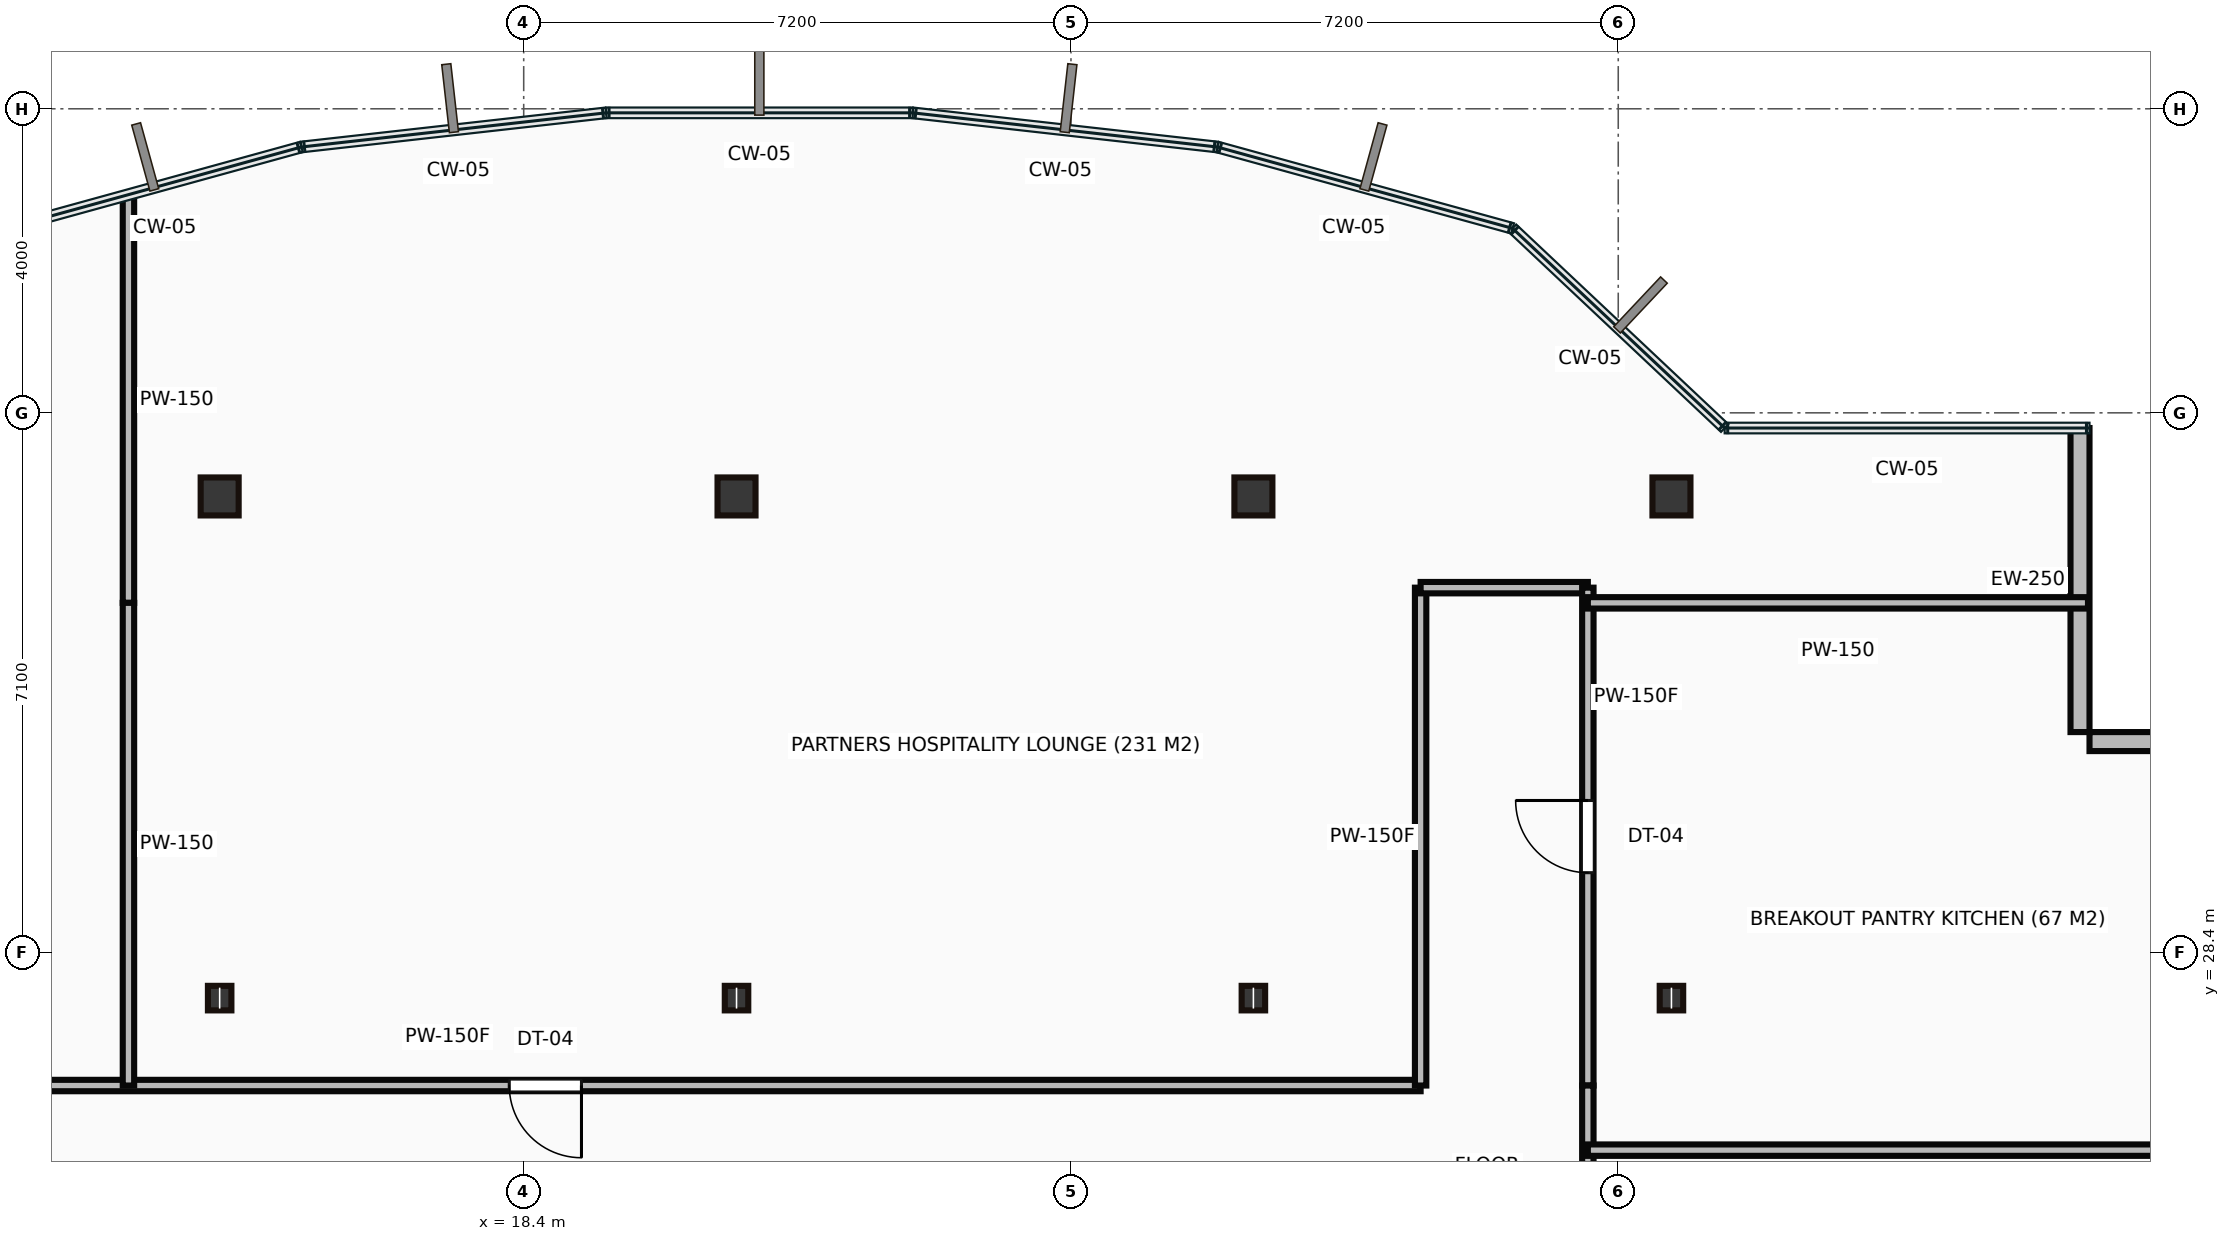
"""IFC4 building model, lengths in metres.
Left out: names, types, materials, properties, quantities, classifications, styles, units other than length and angle.
Written with IfcOpenShell. Run it as: python <this file> out.ifc"""

import sys

from ifc_helpers import new_model, si_unit, direction, frame, frame_2d, origin, origin_2d, place, context, subcontext, project, spatial, rectangle, hollow_rectangle, i_section, extrude, source, transform, mapped, element, fill, save


model = new_model("IFC4")
c1 = context("Model", 3, precision=1e-05, world=origin(), true_north=direction((0.0, 1.0)))
c2 = subcontext(c1, "Body", "Model", "MODEL_VIEW")
j1 = project(units=[si_unit("LENGTHUNIT", "METRE"), si_unit("PLANEANGLEUNIT", "RADIAN")], contexts=[c1])
p1 = place(None, origin())
s1 = spatial("IfcSite", under=j1, at=p1, CompositionType="ELEMENT")
p2 = place(p1, origin())
s2 = spatial("IfcBuilding", under=s1, at=p2, CompositionType="ELEMENT")
p3 = place(p2, frame((0.0, 0.0, 221.45)))
s3 = spatial("IfcBuildingStorey", under=s2, at=p3, CompositionType="ELEMENT", Elevation=221.45)
m1 = source(origin(), c2, "Body", "SweptSolid", [
    extrude(i_section(OverallWidth=0.309, OverallDepth=0.323, WebThickness=0.014, FlangeThickness=0.023, at=origin_2d()), origin(), (0.0, 0.0, 1.0), 3.65),
])
p4 = place(p3, frame((14.4, 27.8, 0.0), z_axis=(0.0, 0.0, 1.0), x_axis=(1.0, 0.0, 0.0)))
e1 = element("IfcColumn", 1, at=p4, inside=s3, PredefinedType="COLUMN", context=c2, shape_type="MappedRepresentation", body=[
    mapped(m1, transform((0.0, 0.0, 0.0))),
])
m2 = source(origin(), c2, "Body", "SweptSolid", [
    extrude(hollow_rectangle(XDim=0.5, YDim=0.5, WallThickness=0.022, at=origin_2d()), origin(), (0.0, 0.0, 1.0), 3.65),
])
p5 = place(p3, frame((14.4, 34.4, 0.0), z_axis=(0.0, 0.0, 1.0), x_axis=(1.0, 0.0, 0.0)))
e2 = element("IfcColumn", 2, at=p5, inside=s3, PredefinedType="COLUMN", context=c2, shape_type="MappedRepresentation", body=[
    mapped(m2, transform((0.0, 0.0, 0.0))),
])
p6 = place(p3, frame((21.2, 27.8, 0.0), z_axis=(0.0, 0.0, 1.0), x_axis=(1.0, 0.0, 0.0)))
e3 = element("IfcColumn", 3, at=p6, inside=s3, PredefinedType="COLUMN", context=c2, shape_type="MappedRepresentation", body=[
    mapped(m1, transform((0.0, 0.0, 0.0))),
])
p7 = place(p3, frame((21.2, 34.4, 0.0), z_axis=(0.0, 0.0, 1.0), x_axis=(1.0, 0.0, 0.0)))
e4 = element("IfcColumn", 4, at=p7, inside=s3, PredefinedType="COLUMN", context=c2, shape_type="MappedRepresentation", body=[
    mapped(m2, transform((0.0, 0.0, 0.0))),
])
p8 = place(p3, frame((28.0, 27.8, 0.0), z_axis=(0.0, 0.0, 1.0), x_axis=(1.0, 0.0, 0.0)))
e5 = element("IfcColumn", 5, at=p8, inside=s3, PredefinedType="COLUMN", context=c2, shape_type="MappedRepresentation", body=[
    mapped(m1, transform((0.0, 0.0, 0.0))),
])
p9 = place(p3, frame((28.0, 34.4, 0.0), z_axis=(0.0, 0.0, 1.0), x_axis=(1.0, 0.0, 0.0)))
e6 = element("IfcColumn", 6, at=p9, inside=s3, PredefinedType="COLUMN", context=c2, shape_type="MappedRepresentation", body=[
    mapped(m2, transform((0.0, 0.0, 0.0))),
])
p10 = place(p3, frame((33.5, 27.8, 0.0), z_axis=(0.0, 0.0, 1.0), x_axis=(1.0, 0.0, 0.0)))
e7 = element("IfcColumn", 7, at=p10, inside=s3, PredefinedType="COLUMN", context=c2, shape_type="MappedRepresentation", body=[
    mapped(m1, transform((0.0, 0.0, 0.0))),
])
p11 = place(p3, frame((33.5, 34.4, 0.0), z_axis=(0.0, 0.0, 1.0), x_axis=(1.0, 0.0, 0.0)))
e8 = element("IfcColumn", 8, at=p11, inside=s3, PredefinedType="COLUMN", context=c2, shape_type="MappedRepresentation", body=[
    mapped(m2, transform((0.0, 0.0, 0.0))),
])
m3 = source(origin(), c2, "Body", "SweptSolid", [
    extrude(rectangle(XDim=4.0, YDim=0.25, at=frame_2d((2.0, 0.0))), origin(), (0.0, 0.0, 1.0), 3.4),
])
for number, where, z_axis, x_axis in (
    (9, (43.0, 31.175, 0.0), (0.0, 0.0, 1.0), (-1.0, 0.0, 0.0)),
    (10, (38.875, 31.3, 0.0), (0.0, 0.0, 1.0), (0.0, 1.0, 0.0)),
):
    element("IfcWall", number, at=place(p3, frame(where, z_axis=z_axis, x_axis=x_axis)), inside=s3, PredefinedType="STANDARD", context=c2, shape_type="MappedRepresentation", body=[
        mapped(m3, transform((0.0, 0.0, 0.0))),
    ])
m4 = source(origin(), c2, "Body", "SweptSolid", [
    extrude(rectangle(XDim=25.6, YDim=0.15, at=frame_2d((12.8, 0.0))), origin(), (0.0, 0.0, 1.0), 3.4),
])
p12 = place(p3, frame((4.6, 26.65, 0.0), z_axis=(0.0, 0.0, 1.0), x_axis=(1.0, 0.0, 0.0)))
e11 = element("IfcWall", 11, at=p12, inside=s3, PredefinedType="PARTITIONING", context=c2, shape_type="MappedRepresentation", body=[
    mapped(m4, transform((0.0, 0.0, 0.0))),
])
p13 = place(p12, frame((3.955, 0.0, 0.0)))
e12 = element("IfcOpeningElement", 12, at=p13, cuts=e11, PredefinedType="OPENING", context=c2, shape_type="SweptSolid", body=[
    extrude(rectangle(XDim=0.95, YDim=2.15, at=frame_2d((0.475, 1.075))), frame((0.0, 0.085, 0.0), z_axis=(0.0, -1.0, 0.0), x_axis=(1.0, 0.0, 0.0)), (0.0, 0.0, 1.0), 0.17),
])
p14 = place(p12, frame((13.61, 0.0, 0.0)))
e13 = element("IfcOpeningElement", 13, at=p14, cuts=e11, PredefinedType="OPENING", context=c2, shape_type="SweptSolid", body=[
    extrude(rectangle(XDim=0.95, YDim=2.15, at=frame_2d((0.475, 1.075))), frame((0.0, 0.085, 0.0), z_axis=(0.0, -1.0, 0.0), x_axis=(1.0, 0.0, 0.0)), (0.0, 0.0, 1.0), 0.17),
])
m5 = source(origin(), c2, "Body", "SweptSolid", [
    extrude(rectangle(XDim=6.55, YDim=0.15, at=frame_2d((3.275, 0.0))), origin(), (0.0, 0.0, 1.0), 3.4),
])
p15 = place(p3, frame((30.2, 26.65, 0.0), z_axis=(0.0, 0.0, 1.0), x_axis=(0.0, 1.0, 0.0)))
e14 = element("IfcWall", 14, at=p15, inside=s3, PredefinedType="PARTITIONING", context=c2, shape_type="MappedRepresentation", body=[
    mapped(m5, transform((0.0, 0.0, 0.0))),
])
m6 = source(origin(), c2, "Body", "SweptSolid", [
    extrude(rectangle(XDim=2.2, YDim=0.15, at=frame_2d((1.1, 0.0))), origin(), (0.0, 0.0, 1.0), 3.4),
])
p16 = place(p3, frame((30.2, 33.2, 0.0), z_axis=(0.0, 0.0, 1.0), x_axis=(1.0, 0.0, 0.0)))
e15 = element("IfcWall", 15, at=p16, inside=s3, PredefinedType="PARTITIONING", context=c2, shape_type="MappedRepresentation", body=[
    mapped(m6, transform((0.0, 0.0, 0.0))),
])
p17 = place(p3, frame((32.4, 33.2, 0.0), z_axis=(0.0, 0.0, 1.0), x_axis=(0.0, -1.0, 0.0)))
e16 = element("IfcWall", 16, at=p17, inside=s3, PredefinedType="PARTITIONING", context=c2, shape_type="MappedRepresentation", body=[
    mapped(m5, transform((0.0, 0.0, 0.0))),
])
p18 = place(p17, frame((2.8, 0.0, 0.0)))
e17 = element("IfcOpeningElement", 17, at=p18, cuts=e16, PredefinedType="OPENING", context=c2, shape_type="SweptSolid", body=[
    extrude(rectangle(XDim=0.95, YDim=2.15, at=frame_2d((0.475, 1.075))), frame((0.0, 0.085, 0.0), z_axis=(0.0, -1.0, 0.0), x_axis=(1.0, 0.0, 0.0)), (0.0, 0.0, 1.0), 0.17),
])
m7 = source(origin(), c2, "Body", "SweptSolid", [
    extrude(rectangle(XDim=2.05, YDim=0.15, at=frame_2d((1.025, 0.0))), origin(), (0.0, 0.0, 1.0), 3.4),
])
p19 = place(p3, frame((32.4, 26.65, 0.0), z_axis=(0.0, 0.0, 1.0), x_axis=(0.0, -1.0, 0.0)))
e18 = element("IfcWall", 18, at=p19, inside=s3, PredefinedType="PARTITIONING", context=c2, shape_type="MappedRepresentation", body=[
    mapped(m7, transform((0.0, 0.0, 0.0))),
])
m8 = source(origin(), c2, "Body", "SweptSolid", [
    extrude(rectangle(XDim=5.35, YDim=0.15, at=frame_2d((2.675, 0.0))), origin(), (0.0, 0.0, 1.0), 3.4),
])
p20 = place(p3, frame((13.2, 38.35, 0.0), z_axis=(0.0, 0.0, 1.0), x_axis=(0.0, -1.0, 0.0)))
e19 = element("IfcWall", 19, at=p20, inside=s3, PredefinedType="PARTITIONING", context=c2, shape_type="MappedRepresentation", body=[
    mapped(m8, transform((0.0, 0.0, 0.0))),
])
m9 = source(origin(), c2, "Body", "SweptSolid", [
    extrude(rectangle(XDim=6.35, YDim=0.15, at=frame_2d((3.175, 0.0))), origin(), (0.0, 0.0, 1.0), 3.4),
])
p21 = place(p3, frame((13.2, 33.0, 0.0), z_axis=(0.0, 0.0, 1.0), x_axis=(0.0, -1.0, 0.0)))
e20 = element("IfcWall", 20, at=p21, inside=s3, PredefinedType="PARTITIONING", context=c2, shape_type="MappedRepresentation", body=[
    mapped(m9, transform((0.0, 0.0, 0.0))),
])
m10 = source(origin(), c2, "Body", "SweptSolid", [
    extrude(rectangle(XDim=10.58, YDim=0.15, at=frame_2d((5.29, 0.0))), origin(), (0.0, 0.0, 1.0), 3.4),
])
p22 = place(p3, frame((42.98, 25.8, 0.0), z_axis=(0.0, 0.0, 1.0), x_axis=(-1.0, 0.0, 0.0)))
e21 = element("IfcWall", 21, at=p22, inside=s3, PredefinedType="PARTITIONING", context=c2, shape_type="MappedRepresentation", body=[
    mapped(m10, transform((0.0, 0.0, 0.0))),
])
m11 = source(origin(), c2, "Body", "SweptSolid", [
    extrude(rectangle(XDim=6.58, YDim=0.15, at=frame_2d((3.29, 0.0))), origin(), (0.0, 0.0, 1.0), 3.4),
])
p23 = place(p3, frame((38.98, 33.0, 0.0), z_axis=(0.0, 0.0, 1.0), x_axis=(-1.0, 0.0, 0.0)))
e22 = element("IfcWall", 22, at=p23, inside=s3, PredefinedType="PARTITIONING", context=c2, shape_type="MappedRepresentation", body=[
    mapped(m11, transform((0.0, 0.0, 0.0))),
])
m12 = source(origin(), c2, "Body", "SweptSolid", [
    extrude(rectangle(XDim=0.95, YDim=2.15, at=frame_2d((0.475, 1.075))), frame((0.0, 0.025, 0.0), z_axis=(0.0, -1.0, 0.0), x_axis=(1.0, 0.0, 0.0)), (0.0, 0.0, 1.0), 0.05),
])
p24 = place(p14, origin())
e23 = element("IfcDoor", 23, at=p24, inside=s3, OperationType="SINGLE_SWING_RIGHT", PredefinedType="DOOR", context=c2, shape_type="MappedRepresentation", body=[
    mapped(m12, transform((0.0, 0.0, 0.0))),
])
fill(e13, e23)
p25 = place(p18, origin())
e24 = element("IfcDoor", 24, at=p25, inside=s3, OperationType="SINGLE_SWING_LEFT", PredefinedType="DOOR", context=c2, shape_type="MappedRepresentation", body=[
    mapped(m12, transform((0.0, 0.0, 0.0))),
])
fill(e17, e24)
save(model, sys.argv[1])
